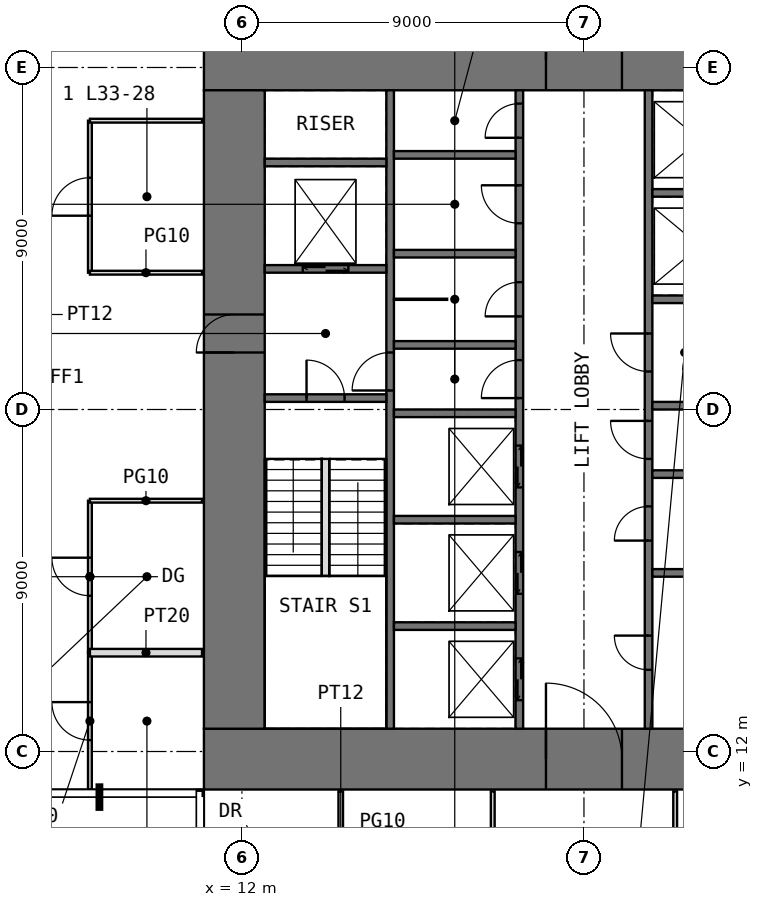
"""IFC4 building model, lengths in metres.
Left out: names, types, materials, properties, quantities, classifications, styles, units other than length and angle.
Written with IfcOpenShell. Run it as: python <this file> out.ifc"""

import sys

from ifc_helpers import new_model, si_unit, direction, frame, frame_2d, origin, place, context, subcontext, project, spatial, rectangle, extrude, element, fill, save


model = new_model("IFC4")
c1 = context("Model", 3, precision=1e-05, world=origin(), true_north=direction((0.0, 1.0)))
c2 = subcontext(c1, "Body", "Model", "MODEL_VIEW")
j1 = project(units=[si_unit("LENGTHUNIT", "METRE"), si_unit("PLANEANGLEUNIT", "RADIAN")], contexts=[c1])
p1 = place(None, origin())
s1 = spatial("IfcSite", under=j1, at=p1, CompositionType="ELEMENT")
p2 = place(p1, origin())
s2 = spatial("IfcBuilding", under=s1, at=p2, CompositionType="ELEMENT")
p3 = place(p2, frame((0.0, 0.0, 140.5)))
s3 = spatial("IfcBuildingStorey", under=s2, at=p3, CompositionType="ELEMENT", Elevation=140.5)
p4 = place(p3, frame((11.0, 11.8, -0.05), z_axis=(0.0, 0.0, 1.0), x_axis=(1.0, 0.0, 0.0)))
e1 = element("IfcWall", 1, at=p4, inside=s3, PredefinedType="SHEAR", context=c2, shape_type="SweptSolid", body=[
    extrude(rectangle(XDim=20.0, YDim=1.6, at=frame_2d((10.0, 0.0))), origin(), (0.0, 0.0, 1.0), 4.0),
])
p5 = place(p4, frame((9.0, 0.0, 0.05)))
e2 = element("IfcOpeningElement", 2, at=p5, cuts=e1, PredefinedType="OPENING", context=c2, shape_type="SweptSolid", body=[
    extrude(rectangle(XDim=2.0, YDim=2.2, at=frame_2d((1.0, 1.1))), frame((0.0, 0.81, 0.0), z_axis=(0.0, -1.0, 0.0), x_axis=(1.0, 0.0, 0.0)), (0.0, 0.0, 1.0), 1.62),
])
p6 = place(p3, frame((11.0, 30.2, -0.05), z_axis=(0.0, 0.0, 1.0), x_axis=(1.0, 0.0, 0.0)))
e3 = element("IfcWall", 3, at=p6, inside=s3, PredefinedType="SHEAR", context=c2, shape_type="SweptSolid", body=[
    extrude(rectangle(XDim=20.0, YDim=1.6, at=frame_2d((10.0, 0.0))), origin(), (0.0, 0.0, 1.0), 4.0),
])
p7 = place(p6, frame((9.0, 0.0, 0.05)))
e4 = element("IfcOpeningElement", 4, at=p7, cuts=e3, PredefinedType="OPENING", context=c2, shape_type="SweptSolid", body=[
    extrude(rectangle(XDim=2.0, YDim=2.2, at=frame_2d((1.0, 1.1))), frame((0.0, 0.81, 0.0), z_axis=(0.0, -1.0, 0.0), x_axis=(1.0, 0.0, 0.0)), (0.0, 0.0, 1.0), 1.62),
])
p8 = place(p3, frame((11.8, 12.6, -0.05), z_axis=(0.0, 0.0, 1.0), x_axis=(0.0, 1.0, 0.0)))
e5 = element("IfcWall", 5, at=p8, inside=s3, PredefinedType="SHEAR", context=c2, shape_type="SweptSolid", body=[
    extrude(rectangle(XDim=16.8, YDim=1.6, at=frame_2d((8.4, 0.0))), origin(), (0.0, 0.0, 1.0), 4.0),
])
p9 = place(p8, frame((9.9, 0.0, 0.05)))
e6 = element("IfcOpeningElement", 6, at=p9, cuts=e5, PredefinedType="OPENING", context=c2, shape_type="SweptSolid", body=[
    extrude(rectangle(XDim=1.0, YDim=2.2, at=frame_2d((0.5, 1.1))), frame((0.0, 0.81, 0.0), z_axis=(0.0, -1.0, 0.0), x_axis=(1.0, 0.0, 0.0)), (0.0, 0.0, 1.0), 1.62),
])
p10 = place(p3, frame((15.9, 12.6, -0.05), z_axis=(0.0, 0.0, 1.0), x_axis=(0.0, 1.0, 0.0)))
e7 = element("IfcWall", 7, at=p10, inside=s3, PredefinedType="SHEAR", context=c2, shape_type="SweptSolid", body=[
    extrude(rectangle(XDim=16.8, YDim=0.2, at=frame_2d((8.4, 0.0))), origin(), (0.0, 0.0, 1.0), 4.0),
])
p11 = place(p10, frame((8.9, 0.0, 0.05)))
e8 = element("IfcOpeningElement", 8, at=p11, cuts=e7, PredefinedType="OPENING", context=c2, shape_type="SweptSolid", body=[
    extrude(rectangle(XDim=1.0, YDim=2.2, at=frame_2d((0.5, 1.1))), frame((0.0, 0.11, 0.0), z_axis=(0.0, -1.0, 0.0), x_axis=(1.0, 0.0, 0.0)), (0.0, 0.0, 1.0), 0.22),
])
p12 = place(p3, frame((19.3, 12.6, -0.05), z_axis=(0.0, 0.0, 1.0), x_axis=(0.0, 1.0, 0.0)))
e9 = element("IfcWall", 9, at=p12, inside=s3, PredefinedType="SHEAR", context=c2, shape_type="SweptSolid", body=[
    extrude(rectangle(XDim=16.8, YDim=0.2, at=frame_2d((8.4, 0.0))), origin(), (0.0, 0.0, 1.0), 4.0),
])
p13 = place(p12, frame((8.7, 0.0, 0.05)))
e10 = element("IfcOpeningElement", 10, at=p13, cuts=e9, PredefinedType="OPENING", context=c2, shape_type="SweptSolid", body=[
    extrude(rectangle(XDim=1.0, YDim=2.2, at=frame_2d((0.5, 1.1))), frame((0.0, 0.11, 0.0), z_axis=(0.0, -1.0, 0.0), x_axis=(1.0, 0.0, 0.0)), (0.0, 0.0, 1.0), 0.22),
])
p14 = place(p12, frame((10.85, 0.0, 0.05)))
e11 = element("IfcOpeningElement", 11, at=p14, cuts=e9, PredefinedType="OPENING", context=c2, shape_type="SweptSolid", body=[
    extrude(rectangle(XDim=0.9, YDim=2.2, at=frame_2d((0.45, 1.1))), frame((0.0, 0.11, 0.0), z_axis=(0.0, -1.0, 0.0), x_axis=(1.0, 0.0, 0.0)), (0.0, 0.0, 1.0), 0.22),
])
p15 = place(p12, frame((13.3, 0.0, 0.05)))
e12 = element("IfcOpeningElement", 12, at=p15, cuts=e9, PredefinedType="OPENING", context=c2, shape_type="SweptSolid", body=[
    extrude(rectangle(XDim=1.0, YDim=2.2, at=frame_2d((0.5, 1.1))), frame((0.0, 0.11, 0.0), z_axis=(0.0, -1.0, 0.0), x_axis=(1.0, 0.0, 0.0)), (0.0, 0.0, 1.0), 0.22),
])
p16 = place(p12, frame((15.55, 0.0, 0.05)))
e13 = element("IfcOpeningElement", 13, at=p16, cuts=e9, PredefinedType="OPENING", context=c2, shape_type="SweptSolid", body=[
    extrude(rectangle(XDim=0.9, YDim=2.2, at=frame_2d((0.45, 1.1))), frame((0.0, 0.11, 0.0), z_axis=(0.0, -1.0, 0.0), x_axis=(1.0, 0.0, 0.0)), (0.0, 0.0, 1.0), 0.22),
])
p17 = place(p12, frame((0.75, 0.0, 0.05)))
e14 = element("IfcOpeningElement", 14, at=p17, cuts=e9, PredefinedType="OPENING", context=c2, shape_type="SweptSolid", body=[
    extrude(rectangle(XDim=1.1, YDim=2.2, at=frame_2d((0.55, 1.1))), frame((0.0, 0.11, 0.0), z_axis=(0.0, -1.0, 0.0), x_axis=(1.0, 0.0, 0.0)), (0.0, 0.0, 1.0), 0.22),
])
p18 = place(p12, frame((3.55, 0.0, 0.05)))
e15 = element("IfcOpeningElement", 15, at=p18, cuts=e9, PredefinedType="OPENING", context=c2, shape_type="SweptSolid", body=[
    extrude(rectangle(XDim=1.1, YDim=2.2, at=frame_2d((0.55, 1.1))), frame((0.0, 0.11, 0.0), z_axis=(0.0, -1.0, 0.0), x_axis=(1.0, 0.0, 0.0)), (0.0, 0.0, 1.0), 0.22),
])
p19 = place(p12, frame((6.35, 0.0, 0.05)))
e16 = element("IfcOpeningElement", 16, at=p19, cuts=e9, PredefinedType="OPENING", context=c2, shape_type="SweptSolid", body=[
    extrude(rectangle(XDim=1.1, YDim=2.2, at=frame_2d((0.55, 1.1))), frame((0.0, 0.11, 0.0), z_axis=(0.0, -1.0, 0.0), x_axis=(1.0, 0.0, 0.0)), (0.0, 0.0, 1.0), 0.22),
])
p20 = place(p3, frame((22.7, 12.6, -0.05), z_axis=(0.0, 0.0, 1.0), x_axis=(0.0, 1.0, 0.0)))
e17 = element("IfcWall", 17, at=p20, inside=s3, PredefinedType="SHEAR", context=c2, shape_type="SweptSolid", body=[
    extrude(rectangle(XDim=16.8, YDim=0.2, at=frame_2d((8.4, 0.0))), origin(), (0.0, 0.0, 1.0), 4.0),
])
p21 = place(p20, frame((7.1, 0.0, 0.05)))
e18 = element("IfcOpeningElement", 18, at=p21, cuts=e17, PredefinedType="OPENING", context=c2, shape_type="SweptSolid", body=[
    extrude(rectangle(XDim=1.0, YDim=2.2, at=frame_2d((0.5, 1.1))), frame((0.0, 0.11, 0.0), z_axis=(0.0, -1.0, 0.0), x_axis=(1.0, 0.0, 0.0)), (0.0, 0.0, 1.0), 0.22),
])
p22 = place(p20, frame((1.55, 0.0, 0.05)))
e19 = element("IfcOpeningElement", 19, at=p22, cuts=e17, PredefinedType="OPENING", context=c2, shape_type="SweptSolid", body=[
    extrude(rectangle(XDim=0.9, YDim=2.2, at=frame_2d((0.45, 1.1))), frame((0.0, 0.11, 0.0), z_axis=(0.0, -1.0, 0.0), x_axis=(1.0, 0.0, 0.0)), (0.0, 0.0, 1.0), 0.22),
])
p23 = place(p20, frame((4.95, 0.0, 0.05)))
e20 = element("IfcOpeningElement", 20, at=p23, cuts=e17, PredefinedType="OPENING", context=c2, shape_type="SweptSolid", body=[
    extrude(rectangle(XDim=0.9, YDim=2.2, at=frame_2d((0.45, 1.1))), frame((0.0, 0.11, 0.0), z_axis=(0.0, -1.0, 0.0), x_axis=(1.0, 0.0, 0.0)), (0.0, 0.0, 1.0), 0.22),
])
p24 = place(p20, frame((9.4, 0.0, 0.05)))
e21 = element("IfcOpeningElement", 21, at=p24, cuts=e17, PredefinedType="OPENING", context=c2, shape_type="SweptSolid", body=[
    extrude(rectangle(XDim=1.0, YDim=2.2, at=frame_2d((0.5, 1.1))), frame((0.0, 0.11, 0.0), z_axis=(0.0, -1.0, 0.0), x_axis=(1.0, 0.0, 0.0)), (0.0, 0.0, 1.0), 0.22),
])
p25 = place(p3, frame((12.6, 21.3, -0.05), z_axis=(0.0, 0.0, 1.0), x_axis=(1.0, 0.0, 0.0)))
e22 = element("IfcWall", 22, at=p25, inside=s3, PredefinedType="SHEAR", context=c2, shape_type="SweptSolid", body=[
    extrude(rectangle(XDim=3.2, YDim=0.2, at=frame_2d((1.6, 0.0))), origin(), (0.0, 0.0, 1.0), 4.0),
])
p26 = place(p25, frame((1.1, 0.0, 0.05)))
e23 = element("IfcOpeningElement", 23, at=p26, cuts=e22, PredefinedType="OPENING", context=c2, shape_type="SweptSolid", body=[
    extrude(rectangle(XDim=1.0, YDim=2.2, at=frame_2d((0.5, 1.1))), frame((0.0, 0.11, 0.0), z_axis=(0.0, -1.0, 0.0), x_axis=(1.0, 0.0, 0.0)), (0.0, 0.0, 1.0), 0.22),
])
p27 = place(p3, frame((12.6, 24.7, -0.05), z_axis=(0.0, 0.0, 1.0), x_axis=(1.0, 0.0, 0.0)))
e24 = element("IfcWall", 24, at=p27, inside=s3, PredefinedType="SHEAR", context=c2, shape_type="SweptSolid", body=[
    extrude(rectangle(XDim=3.2, YDim=0.2, at=frame_2d((1.6, 0.0))), origin(), (0.0, 0.0, 1.0), 4.0),
])
p28 = place(p27, frame((1.0, 0.0, 0.05)))
e25 = element("IfcOpeningElement", 25, at=p28, cuts=e24, PredefinedType="OPENING", context=c2, shape_type="SweptSolid", body=[
    extrude(rectangle(XDim=1.2, YDim=2.2, at=frame_2d((0.6, 1.1))), frame((0.0, 0.11, 0.0), z_axis=(0.0, -1.0, 0.0), x_axis=(1.0, 0.0, 0.0)), (0.0, 0.0, 1.0), 0.22),
])
for number, where, z_axis, x_axis in (
    (26, (12.6, 27.5, -0.05), (0.0, 0.0, 1.0), (1.0, 0.0, 0.0)),
    (27, (16.0, 15.3, -0.05), (0.0, 0.0, 1.0), (1.0, 0.0, 0.0)),
    (28, (16.0, 18.1, -0.05), (0.0, 0.0, 1.0), (1.0, 0.0, 0.0)),
    (29, (16.0, 20.9, -0.05), (0.0, 0.0, 1.0), (1.0, 0.0, 0.0)),
    (30, (16.0, 22.7, -0.05), (0.0, 0.0, 1.0), (1.0, 0.0, 0.0)),
    (31, (16.0, 25.1, -0.05), (0.0, 0.0, 1.0), (1.0, 0.0, 0.0)),
    (32, (16.0, 27.7, -0.05), (0.0, 0.0, 1.0), (1.0, 0.0, 0.0)),
    (33, (22.8, 16.7, -0.05), (0.0, 0.0, 1.0), (1.0, 0.0, 0.0)),
    (34, (22.8, 19.3, -0.05), (0.0, 0.0, 1.0), (1.0, 0.0, 0.0)),
    (35, (22.8, 21.1, -0.05), (0.0, 0.0, 1.0), (1.0, 0.0, 0.0)),
    (36, (22.8, 23.9, -0.05), (0.0, 0.0, 1.0), (1.0, 0.0, 0.0)),
    (37, (22.8, 26.7, -0.05), (0.0, 0.0, 1.0), (1.0, 0.0, 0.0)),
):
    element("IfcWall", number, at=place(p3, frame(where, z_axis=z_axis, x_axis=x_axis)), inside=s3, PredefinedType="SHEAR", context=c2, shape_type="SweptSolid", body=[
        extrude(rectangle(XDim=3.2, YDim=0.2, at=frame_2d((1.6, 0.0))), origin(), (0.0, 0.0, 1.0), 4.0),
    ])
p29 = place(p3, frame((16.0, 23.9, 0.0), z_axis=(0.0, 0.0, 1.0), x_axis=(1.0, 0.0, 0.0)))
e38 = element("IfcWall", 38, at=p29, inside=s3, PredefinedType="PARTITIONING", context=c2, shape_type="SweptSolid", body=[
    extrude(rectangle(XDim=1.4, YDim=0.03, at=frame_2d((0.7, 0.0))), origin(), (0.0, 0.0, 1.0), 3.75),
])
p30 = place(p3, frame((8.0, 11.0, 0.0), z_axis=(0.0, 0.0, 1.0), x_axis=(0.0, 1.0, 0.0)))
e39 = element("IfcWall", 39, at=p30, inside=s3, PredefinedType="PARTITIONING", context=c2, shape_type="SweptSolid", body=[
    extrude(rectangle(XDim=3.6, YDim=0.1, at=frame_2d((1.8, 0.0))), origin(), (0.0, 0.0, 1.0), 3.75),
])
p31 = place(p30, frame((1.3, 0.0, 0.0)))
e40 = element("IfcOpeningElement", 40, at=p31, cuts=e39, PredefinedType="OPENING", context=c2, shape_type="SweptSolid", body=[
    extrude(rectangle(XDim=1.0, YDim=2.4, at=frame_2d((0.5, 1.2))), frame((0.0, 0.06, 0.0), z_axis=(0.0, -1.0, 0.0), x_axis=(1.0, 0.0, 0.0)), (0.0, 0.0, 1.0), 0.12),
])
p32 = place(p3, frame((8.0, 14.6, 0.0), z_axis=(0.0, 0.0, 1.0), x_axis=(0.0, 1.0, 0.0)))
e41 = element("IfcWall", 41, at=p32, inside=s3, PredefinedType="PARTITIONING", context=c2, shape_type="SweptSolid", body=[
    extrude(rectangle(XDim=4.0, YDim=0.1, at=frame_2d((2.0, 0.0))), origin(), (0.0, 0.0, 1.0), 3.75),
])
p33 = place(p32, frame((1.5, 0.0, 0.0)))
e42 = element("IfcOpeningElement", 42, at=p33, cuts=e41, PredefinedType="OPENING", context=c2, shape_type="SweptSolid", body=[
    extrude(rectangle(XDim=1.0, YDim=2.4, at=frame_2d((0.5, 1.2))), frame((0.0, 0.06, 0.0), z_axis=(0.0, -1.0, 0.0), x_axis=(1.0, 0.0, 0.0)), (0.0, 0.0, 1.0), 0.12),
])
p34 = place(p3, frame((8.0, 14.6, 0.0), z_axis=(0.0, 0.0, 1.0), x_axis=(1.0, 0.0, 0.0)))
e43 = element("IfcWall", 43, at=p34, inside=s3, PredefinedType="PARTITIONING", context=c2, shape_type="SweptSolid", body=[
    extrude(rectangle(XDim=2.95, YDim=0.2, at=frame_2d((1.475, 0.0))), origin(), (0.0, 0.0, 1.0), 3.75),
])
p35 = place(p3, frame((8.0, 18.6, 0.0), z_axis=(0.0, 0.0, 1.0), x_axis=(1.0, 0.0, 0.0)))
e44 = element("IfcWall", 44, at=p35, inside=s3, PredefinedType="PARTITIONING", context=c2, shape_type="SweptSolid", body=[
    extrude(rectangle(XDim=2.95, YDim=0.1, at=frame_2d((1.475, 0.0))), origin(), (0.0, 0.0, 1.0), 3.75),
])
p36 = place(p3, frame((8.0, 24.6, 0.0), z_axis=(0.0, 0.0, 1.0), x_axis=(0.0, 1.0, 0.0)))
e45 = element("IfcWall", 45, at=p36, inside=s3, PredefinedType="PARTITIONING", context=c2, shape_type="SweptSolid", body=[
    extrude(rectangle(XDim=4.0, YDim=0.1, at=frame_2d((2.0, 0.0))), origin(), (0.0, 0.0, 1.0), 3.75),
])
p37 = place(p36, frame((1.5, 0.0, 0.0)))
e46 = element("IfcOpeningElement", 46, at=p37, cuts=e45, PredefinedType="OPENING", context=c2, shape_type="SweptSolid", body=[
    extrude(rectangle(XDim=1.0, YDim=2.4, at=frame_2d((0.5, 1.2))), frame((0.0, 0.06, 0.0), z_axis=(0.0, -1.0, 0.0), x_axis=(1.0, 0.0, 0.0)), (0.0, 0.0, 1.0), 0.12),
])
for number, where, z_axis, x_axis in (
    (47, (8.0, 24.6, 0.0), (0.0, 0.0, 1.0), (1.0, 0.0, 0.0)),
    (48, (8.0, 28.6, 0.0), (0.0, 0.0, 1.0), (1.0, 0.0, 0.0)),
):
    element("IfcWall", number, at=place(p3, frame(where, z_axis=z_axis, x_axis=x_axis)), inside=s3, PredefinedType="PARTITIONING", context=c2, shape_type="SweptSolid", body=[
        extrude(rectangle(XDim=2.95, YDim=0.1, at=frame_2d((1.475, 0.0))), origin(), (0.0, 0.0, 1.0), 3.75),
    ])
p38 = place(p3, frame((14.6, 8.5, 0.0), z_axis=(0.0, 0.0, 1.0), x_axis=(0.0, 1.0, 0.0)))
e49 = element("IfcWall", 49, at=p38, inside=s3, PredefinedType="PARTITIONING", context=c2, shape_type="SweptSolid", body=[
    extrude(rectangle(XDim=2.45, YDim=0.12, at=frame_2d((1.225, 0.0))), origin(), (0.0, 0.0, 1.0), 3.75),
])
for number, where, z_axis, x_axis in (
    (50, (18.6, 8.0, 0.0), (0.0, 0.0, 1.0), (0.0, 1.0, 0.0)),
    (51, (23.4, 8.0, 0.0), (0.0, 0.0, 1.0), (0.0, 1.0, 0.0)),
):
    element("IfcWall", number, at=place(p3, frame(where, z_axis=z_axis, x_axis=x_axis)), inside=s3, PredefinedType="PARTITIONING", context=c2, shape_type="SweptSolid", body=[
        extrude(rectangle(XDim=2.95, YDim=0.1, at=frame_2d((1.475, 0.0))), origin(), (0.0, 0.0, 1.0), 3.75),
    ])
p39 = place(p3, frame((14.2, 16.62, 0.0), z_axis=(0.0, 0.0, 1.0), x_axis=(0.0, 1.0, 0.0)))
e52 = element("IfcWall", 52, at=p39, inside=s3, PredefinedType="PARTITIONING", context=c2, shape_type="SweptSolid", body=[
    extrude(rectangle(XDim=3.08, YDim=0.2, at=frame_2d((1.54, 0.0))), origin(), (0.0, 0.0, 1.0), 4.0),
])
p40 = place(p5, origin())
e53 = element("IfcDoor", 53, at=p40, inside=s3, OperationType="DOUBLE_DOOR_SINGLE_SWING", PredefinedType="DOOR", context=c2, shape_type="SweptSolid", body=[
    extrude(rectangle(XDim=2.0, YDim=2.2, at=frame_2d((1.0, 1.1))), frame((0.0, 0.025, 0.0), z_axis=(0.0, -1.0, 0.0), x_axis=(1.0, 0.0, 0.0)), (0.0, 0.0, 1.0), 0.05),
])
fill(e2, e53)
p41 = place(p7, origin())
e54 = element("IfcDoor", 54, at=p41, inside=s3, OperationType="DOUBLE_DOOR_SINGLE_SWING", PredefinedType="DOOR", context=c2, shape_type="SweptSolid", body=[
    extrude(rectangle(XDim=2.0, YDim=2.2, at=frame_2d((1.0, 1.1))), frame((0.0, 0.025, 0.0), z_axis=(0.0, -1.0, 0.0), x_axis=(1.0, 0.0, 0.0)), (0.0, 0.0, 1.0), 0.05),
])
fill(e4, e54)
p42 = place(p9, origin())
e55 = element("IfcDoor", 55, at=p42, inside=s3, OperationType="SINGLE_SWING_LEFT", PredefinedType="DOOR", context=c2, shape_type="SweptSolid", body=[
    extrude(rectangle(XDim=1.0, YDim=2.2, at=frame_2d((0.5, 1.1))), frame((0.0, 0.025, 0.0), z_axis=(0.0, -1.0, 0.0), x_axis=(1.0, 0.0, 0.0)), (0.0, 0.0, 1.0), 0.05),
])
fill(e6, e55)
p43 = place(p26, origin())
e56 = element("IfcDoor", 56, at=p43, inside=s3, OperationType="SINGLE_SWING_LEFT", PredefinedType="DOOR", context=c2, shape_type="SweptSolid", body=[
    extrude(rectangle(XDim=1.0, YDim=2.2, at=frame_2d((0.5, 1.1))), frame((0.0, 0.025, 0.0), z_axis=(0.0, -1.0, 0.0), x_axis=(1.0, 0.0, 0.0)), (0.0, 0.0, 1.0), 0.05),
])
fill(e23, e56)
p44 = place(p11, origin())
e57 = element("IfcDoor", 57, at=p44, inside=s3, OperationType="SINGLE_SWING_LEFT", PredefinedType="DOOR", context=c2, shape_type="SweptSolid", body=[
    extrude(rectangle(XDim=1.0, YDim=2.2, at=frame_2d((0.5, 1.1))), frame((0.0, 0.025, 0.0), z_axis=(0.0, -1.0, 0.0), x_axis=(1.0, 0.0, 0.0)), (0.0, 0.0, 1.0), 0.05),
])
fill(e8, e57)
p45 = place(p13, origin())
e58 = element("IfcDoor", 58, at=p45, inside=s3, OperationType="SINGLE_SWING_LEFT", PredefinedType="DOOR", context=c2, shape_type="SweptSolid", body=[
    extrude(rectangle(XDim=1.0, YDim=2.2, at=frame_2d((0.5, 1.1))), frame((0.0, 0.025, 0.0), z_axis=(0.0, -1.0, 0.0), x_axis=(1.0, 0.0, 0.0)), (0.0, 0.0, 1.0), 0.05),
])
fill(e10, e58)
p46 = place(p21, origin())
e59 = element("IfcDoor", 59, at=p46, inside=s3, OperationType="SINGLE_SWING_RIGHT", PredefinedType="DOOR", context=c2, shape_type="SweptSolid", body=[
    extrude(rectangle(XDim=1.0, YDim=2.2, at=frame_2d((0.5, 1.1))), frame((0.0, 0.025, 0.0), z_axis=(0.0, -1.0, 0.0), x_axis=(1.0, 0.0, 0.0)), (0.0, 0.0, 1.0), 0.05),
])
fill(e18, e59)
p47 = place(p14, origin())
e60 = element("IfcDoor", 60, at=p47, inside=s3, OperationType="SINGLE_SWING_LEFT", PredefinedType="DOOR", context=c2, shape_type="SweptSolid", body=[
    extrude(rectangle(XDim=0.9, YDim=2.2, at=frame_2d((0.45, 1.1))), frame((0.0, 0.025, 0.0), z_axis=(0.0, -1.0, 0.0), x_axis=(1.0, 0.0, 0.0)), (0.0, 0.0, 1.0), 0.05),
])
fill(e11, e60)
p48 = place(p15, origin())
e61 = element("IfcDoor", 61, at=p48, inside=s3, OperationType="SINGLE_SWING_RIGHT", PredefinedType="DOOR", context=c2, shape_type="SweptSolid", body=[
    extrude(rectangle(XDim=1.0, YDim=2.2, at=frame_2d((0.5, 1.1))), frame((0.0, 0.025, 0.0), z_axis=(0.0, -1.0, 0.0), x_axis=(1.0, 0.0, 0.0)), (0.0, 0.0, 1.0), 0.05),
])
fill(e12, e61)
p49 = place(p16, origin())
e62 = element("IfcDoor", 62, at=p49, inside=s3, OperationType="SINGLE_SWING_LEFT", PredefinedType="DOOR", context=c2, shape_type="SweptSolid", body=[
    extrude(rectangle(XDim=0.9, YDim=2.2, at=frame_2d((0.45, 1.1))), frame((0.0, 0.025, 0.0), z_axis=(0.0, -1.0, 0.0), x_axis=(1.0, 0.0, 0.0)), (0.0, 0.0, 1.0), 0.05),
])
fill(e13, e62)
p50 = place(p22, origin())
e63 = element("IfcDoor", 63, at=p50, inside=s3, OperationType="SINGLE_SWING_RIGHT", PredefinedType="DOOR", context=c2, shape_type="SweptSolid", body=[
    extrude(rectangle(XDim=0.9, YDim=2.2, at=frame_2d((0.45, 1.1))), frame((0.0, 0.025, 0.0), z_axis=(0.0, -1.0, 0.0), x_axis=(1.0, 0.0, 0.0)), (0.0, 0.0, 1.0), 0.05),
])
fill(e19, e63)
p51 = place(p23, origin())
e64 = element("IfcDoor", 64, at=p51, inside=s3, OperationType="SINGLE_SWING_LEFT", PredefinedType="DOOR", context=c2, shape_type="SweptSolid", body=[
    extrude(rectangle(XDim=0.9, YDim=2.2, at=frame_2d((0.45, 1.1))), frame((0.0, 0.025, 0.0), z_axis=(0.0, -1.0, 0.0), x_axis=(1.0, 0.0, 0.0)), (0.0, 0.0, 1.0), 0.05),
])
fill(e20, e64)
p52 = place(p24, origin())
e65 = element("IfcDoor", 65, at=p52, inside=s3, OperationType="SINGLE_SWING_RIGHT", PredefinedType="DOOR", context=c2, shape_type="SweptSolid", body=[
    extrude(rectangle(XDim=1.0, YDim=2.2, at=frame_2d((0.5, 1.1))), frame((0.0, 0.025, 0.0), z_axis=(0.0, -1.0, 0.0), x_axis=(1.0, 0.0, 0.0)), (0.0, 0.0, 1.0), 0.05),
])
fill(e21, e65)
p53 = place(p31, origin())
e66 = element("IfcDoor", 66, at=p53, inside=s3, OperationType="SINGLE_SWING_RIGHT", PredefinedType="DOOR", context=c2, shape_type="SweptSolid", body=[
    extrude(rectangle(XDim=1.0, YDim=2.4, at=frame_2d((0.5, 1.2))), frame((0.0, 0.025, 0.0), z_axis=(0.0, -1.0, 0.0), x_axis=(1.0, 0.0, 0.0)), (0.0, 0.0, 1.0), 0.05),
])
fill(e40, e66)
p54 = place(p33, origin())
e67 = element("IfcDoor", 67, at=p54, inside=s3, OperationType="SINGLE_SWING_RIGHT", PredefinedType="DOOR", context=c2, shape_type="SweptSolid", body=[
    extrude(rectangle(XDim=1.0, YDim=2.4, at=frame_2d((0.5, 1.2))), frame((0.0, 0.025, 0.0), z_axis=(0.0, -1.0, 0.0), x_axis=(1.0, 0.0, 0.0)), (0.0, 0.0, 1.0), 0.05),
])
fill(e42, e67)
p55 = place(p37, origin())
e68 = element("IfcDoor", 68, at=p55, inside=s3, OperationType="SINGLE_SWING_LEFT", PredefinedType="DOOR", context=c2, shape_type="SweptSolid", body=[
    extrude(rectangle(XDim=1.0, YDim=2.4, at=frame_2d((0.5, 1.2))), frame((0.0, 0.025, 0.0), z_axis=(0.0, -1.0, 0.0), x_axis=(1.0, 0.0, 0.0)), (0.0, 0.0, 1.0), 0.05),
])
fill(e46, e68)
p56 = place(p17, origin())
e69 = element("IfcDoor", 69, at=p56, inside=s3, OperationType="DOUBLE_DOOR_SLIDING", PredefinedType="DOOR", context=c2, shape_type="SweptSolid", body=[
    extrude(rectangle(XDim=1.1, YDim=2.2, at=frame_2d((0.55, 1.1))), frame((0.0, 0.025, 0.0), z_axis=(0.0, -1.0, 0.0), x_axis=(1.0, 0.0, 0.0)), (0.0, 0.0, 1.0), 0.05),
])
fill(e14, e69)
p57 = place(p18, origin())
e70 = element("IfcDoor", 70, at=p57, inside=s3, OperationType="DOUBLE_DOOR_SLIDING", PredefinedType="DOOR", context=c2, shape_type="SweptSolid", body=[
    extrude(rectangle(XDim=1.1, YDim=2.2, at=frame_2d((0.55, 1.1))), frame((0.0, 0.025, 0.0), z_axis=(0.0, -1.0, 0.0), x_axis=(1.0, 0.0, 0.0)), (0.0, 0.0, 1.0), 0.05),
])
fill(e15, e70)
p58 = place(p19, origin())
e71 = element("IfcDoor", 71, at=p58, inside=s3, OperationType="DOUBLE_DOOR_SLIDING", PredefinedType="DOOR", context=c2, shape_type="SweptSolid", body=[
    extrude(rectangle(XDim=1.1, YDim=2.2, at=frame_2d((0.55, 1.1))), frame((0.0, 0.025, 0.0), z_axis=(0.0, -1.0, 0.0), x_axis=(1.0, 0.0, 0.0)), (0.0, 0.0, 1.0), 0.05),
])
fill(e16, e71)
p59 = place(p28, origin())
e72 = element("IfcDoor", 72, at=p59, inside=s3, OperationType="DOUBLE_DOOR_SLIDING", PredefinedType="DOOR", context=c2, shape_type="SweptSolid", body=[
    extrude(rectangle(XDim=1.2, YDim=2.2, at=frame_2d((0.6, 1.1))), frame((0.0, 0.025, 0.0), z_axis=(0.0, -1.0, 0.0), x_axis=(1.0, 0.0, 0.0)), (0.0, 0.0, 1.0), 0.05),
])
fill(e25, e72)
save(model, sys.argv[1])
